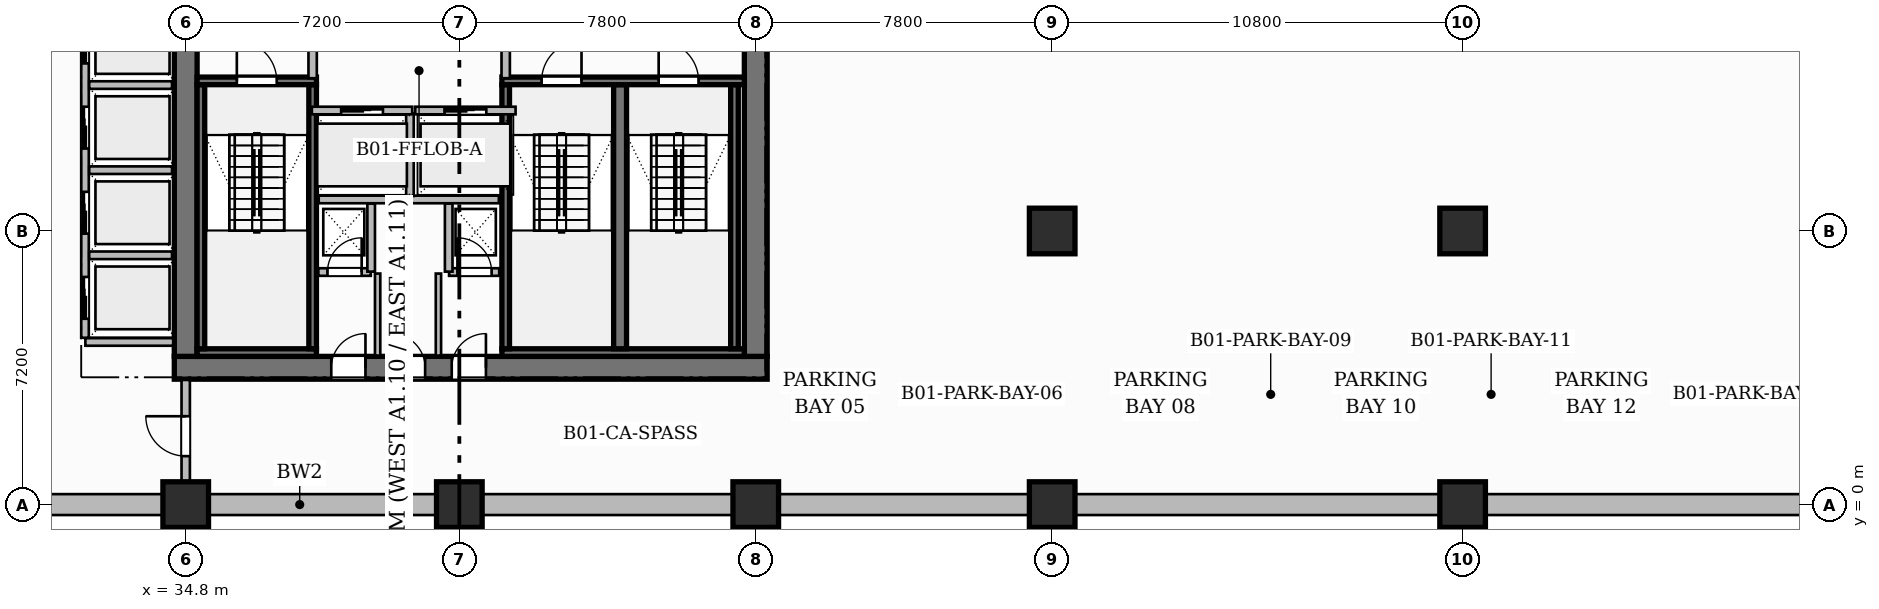
"""IFC4 building model, lengths in metres.
Left out: names, types, materials, properties, quantities, classifications, styles, units other than length and angle.
Written with IfcOpenShell. Run it as: python <this file> out.ifc"""

import sys

from ifc_helpers import new_model, si_unit, direction, frame, frame_2d, origin, origin_2d, place, context, subcontext, project, spatial, rectangle, extrude, source, transform, mapped, element, fill, save


model = new_model("IFC4")
c1 = context("Model", 3, precision=1e-05, world=origin(), true_north=direction((0.0, 1.0)))
c2 = subcontext(c1, "Body", "Model", "MODEL_VIEW")
j1 = project(units=[si_unit("LENGTHUNIT", "METRE"), si_unit("PLANEANGLEUNIT", "RADIAN")], contexts=[c1])
p1 = place(None, origin())
s1 = spatial("IfcSite", under=j1, at=p1, CompositionType="ELEMENT")
p2 = place(p1, origin())
s2 = spatial("IfcBuilding", under=s1, at=p2, CompositionType="ELEMENT")
p3 = place(p2, frame((0.0, 0.0, -6.5)))
s3 = spatial("IfcBuildingStorey", under=s2, at=p3, CompositionType="ELEMENT", Elevation=-6.5)
p4 = place(p3, frame((-4.8, 0.0, 0.0), z_axis=(0.0, 0.0, 1.0), x_axis=(1.0, 0.0, 0.0)))
e1 = element("IfcWall", 1, at=p4, inside=s3, PredefinedType="USERDEFINED", context=c2, shape_type="SweptSolid", body=[
    extrude(rectangle(XDim=85.2, YDim=0.55, at=frame_2d((42.6, 0.0))), origin(), (0.0, 0.0, 1.0), 6.5),
])
p5 = place(p3, frame((34.5, 3.6, 0.0), z_axis=(0.0, 0.0, 1.0), x_axis=(1.0, 0.0, 0.0)))
e2 = element("IfcWall", 2, at=p5, inside=s3, PredefinedType="SHEAR", context=c2, shape_type="SweptSolid", body=[
    extrude(rectangle(XDim=15.6, YDim=0.6, at=frame_2d((7.8, 0.0))), origin(), (0.0, 0.0, 1.0), 6.5),
])
p6 = place(p5, frame((4.13, 0.0, 0.0)))
e3 = element("IfcOpeningElement", 3, at=p6, cuts=e2, PredefinedType="OPENING", context=c2, shape_type="SweptSolid", body=[
    extrude(rectangle(XDim=0.9, YDim=2.1, at=frame_2d((0.45, 1.05))), frame((0.0, 0.31, 0.0), z_axis=(0.0, -1.0, 0.0), x_axis=(1.0, 0.0, 0.0)), (0.0, 0.0, 1.0), 0.62),
])
p7 = place(p5, frame((5.7, 0.0, 0.0)))
e4 = element("IfcOpeningElement", 4, at=p7, cuts=e2, PredefinedType="OPENING", context=c2, shape_type="SweptSolid", body=[
    extrude(rectangle(XDim=0.9, YDim=2.1, at=frame_2d((0.45, 1.05))), frame((0.0, 0.31, 0.0), z_axis=(0.0, -1.0, 0.0), x_axis=(1.0, 0.0, 0.0)), (0.0, 0.0, 1.0), 0.62),
])
p8 = place(p5, frame((7.3, 0.0, 0.0)))
e5 = element("IfcOpeningElement", 5, at=p8, cuts=e2, PredefinedType="OPENING", context=c2, shape_type="SweptSolid", body=[
    extrude(rectangle(XDim=0.9, YDim=2.1, at=frame_2d((0.45, 1.05))), frame((0.0, 0.31, 0.0), z_axis=(0.0, -1.0, 0.0), x_axis=(1.0, 0.0, 0.0)), (0.0, 0.0, 1.0), 0.62),
])
for number, where, z_axis, x_axis in (
    (6, (34.8, 3.9, 0.0), (0.0, 0.0, 1.0), (0.0, 1.0, 0.0)),
    (7, (49.8, 3.9, 0.0), (0.0, 0.0, 1.0), (0.0, 1.0, 0.0)),
):
    element("IfcWall", number, at=place(p3, frame(where, z_axis=z_axis, x_axis=x_axis)), inside=s3, PredefinedType="SHEAR", context=c2, shape_type="SweptSolid", body=[
        extrude(rectangle(XDim=10.2, YDim=0.6, at=frame_2d((5.1, 0.0))), origin(), (0.0, 0.0, 1.0), 6.5),
    ])
m1 = source(origin(), c2, "Body", "SweptSolid", [
    extrude(rectangle(XDim=1.2, YDim=1.2, at=origin_2d()), origin(), (0.0, 0.0, 1.0), 6.5),
])
for number, where, z_axis, x_axis in (
    (8, (34.8, 0.0, 0.0), (0.0, 0.0, 1.0), (1.0, 0.0, 0.0)),
    (9, (42.0, 0.0, 0.0), (0.0, 0.0, 1.0), (1.0, 0.0, 0.0)),
    (10, (49.8, 0.0, 0.0), (0.0, 0.0, 1.0), (1.0, 0.0, 0.0)),
    (11, (57.6, 0.0, 0.0), (0.0, 0.0, 1.0), (1.0, 0.0, 0.0)),
    (12, (57.6, 7.2, 0.0), (0.0, 0.0, 1.0), (1.0, 0.0, 0.0)),
    (13, (68.4, 0.0, 0.0), (0.0, 0.0, 1.0), (1.0, 0.0, 0.0)),
    (14, (68.4, 7.2, 0.0), (0.0, 0.0, 1.0), (1.0, 0.0, 0.0)),
):
    element("IfcColumn", number, at=place(p3, frame(where, z_axis=z_axis, x_axis=x_axis)), inside=s3, PredefinedType="COLUMN", context=c2, shape_type="MappedRepresentation", body=[
        mapped(m1, transform((0.0, 0.0, 0.0), scale=1.0)),
    ])
p9 = place(p3, frame((35.1, 4.0, 0.0), z_axis=(0.0, 0.0, 1.0), x_axis=(1.0, 0.0, 0.0)))
e15 = element("IfcWall", 15, at=p9, inside=s3, PredefinedType="SHEAR", context=c2, shape_type="SweptSolid", body=[
    extrude(rectangle(XDim=3.14, YDim=0.2, at=frame_2d((1.57, 0.0))), origin(), (0.0, 0.0, 1.0), 6.5),
])
for number, where, z_axis, x_axis in (
    (16, (35.2, 4.1, 0.0), (0.0, 0.0, 1.0), (0.0, 1.0, 0.0)),
    (17, (38.14, 4.1, 0.0), (0.0, 0.0, 1.0), (0.0, 1.0, 0.0)),
):
    element("IfcWall", number, at=place(p3, frame(where, z_axis=z_axis, x_axis=x_axis)), inside=s3, PredefinedType="SHEAR", context=c2, shape_type="SweptSolid", body=[
        extrude(rectangle(XDim=6.95, YDim=0.2, at=frame_2d((3.475, 0.0))), origin(), (0.0, 0.0, 1.0), 6.5),
    ])
p10 = place(p3, frame((35.1, 11.15, 0.0), z_axis=(0.0, 0.0, 1.0), x_axis=(1.0, 0.0, 0.0)))
e18 = element("IfcWall", 18, at=p10, inside=s3, PredefinedType="SHEAR", context=c2, shape_type="SweptSolid", body=[
    extrude(rectangle(XDim=3.14, YDim=0.2, at=frame_2d((1.57, 0.0))), origin(), (0.0, 0.0, 1.0), 6.5),
])
p11 = place(p10, frame((1.045, 0.0, 0.0)))
e19 = element("IfcOpeningElement", 19, at=p11, cuts=e18, PredefinedType="OPENING", context=c2, shape_type="SweptSolid", body=[
    extrude(rectangle(XDim=1.05, YDim=2.2, at=frame_2d((0.525, 1.1))), frame((0.0, 0.11, 0.0), z_axis=(0.0, -1.0, 0.0), x_axis=(1.0, 0.0, 0.0)), (0.0, 0.0, 1.0), 0.22),
])
p12 = place(p3, frame((43.12, 4.0, 0.0), z_axis=(0.0, 0.0, 1.0), x_axis=(1.0, 0.0, 0.0)))
e20 = element("IfcWall", 20, at=p12, inside=s3, PredefinedType="SHEAR", context=c2, shape_type="SweptSolid", body=[
    extrude(rectangle(XDim=6.38, YDim=0.2, at=frame_2d((3.19, 0.0))), origin(), (0.0, 0.0, 1.0), 6.5),
])
p13 = place(p3, frame((43.22, 4.1, 0.0), z_axis=(0.0, 0.0, 1.0), x_axis=(0.0, 1.0, 0.0)))
e21 = element("IfcWall", 21, at=p13, inside=s3, PredefinedType="SHEAR", context=c2, shape_type="SweptSolid", body=[
    extrude(rectangle(XDim=6.95, YDim=0.2, at=frame_2d((3.475, 0.0))), origin(), (0.0, 0.0, 1.0), 6.5),
])
p14 = place(p3, frame((46.23, 4.1, 0.0), z_axis=(0.0, 0.0, 1.0), x_axis=(0.0, 1.0, 0.0)))
e22 = element("IfcWall", 22, at=p14, inside=s3, PredefinedType="SHEAR", context=c2, shape_type="SweptSolid", body=[
    extrude(rectangle(XDim=6.95, YDim=0.34, at=frame_2d((3.475, 0.0))), origin(), (0.0, 0.0, 1.0), 6.5),
])
p15 = place(p3, frame((49.24, 4.1, 0.0), z_axis=(0.0, 0.0, 1.0), x_axis=(0.0, 1.0, 0.0)))
e23 = element("IfcWall", 23, at=p15, inside=s3, PredefinedType="SHEAR", context=c2, shape_type="SweptSolid", body=[
    extrude(rectangle(XDim=6.95, YDim=0.2, at=frame_2d((3.475, 0.0))), origin(), (0.0, 0.0, 1.0), 6.5),
])
p16 = place(p3, frame((43.12, 11.15, 0.0), z_axis=(0.0, 0.0, 1.0), x_axis=(1.0, 0.0, 0.0)))
e24 = element("IfcWall", 24, at=p16, inside=s3, PredefinedType="SHEAR", context=c2, shape_type="SweptSolid", body=[
    extrude(rectangle(XDim=6.38, YDim=0.2, at=frame_2d((3.19, 0.0))), origin(), (0.0, 0.0, 1.0), 6.5),
])
p17 = place(p16, frame((1.045, 0.0, 0.0)))
e25 = element("IfcOpeningElement", 25, at=p17, cuts=e24, PredefinedType="OPENING", context=c2, shape_type="SweptSolid", body=[
    extrude(rectangle(XDim=1.05, YDim=2.2, at=frame_2d((0.525, 1.1))), frame((0.0, 0.11, 0.0), z_axis=(0.0, -1.0, 0.0), x_axis=(1.0, 0.0, 0.0)), (0.0, 0.0, 1.0), 0.22),
])
p18 = place(p16, frame((4.125, 0.0, 0.0)))
e26 = element("IfcOpeningElement", 26, at=p18, cuts=e24, PredefinedType="OPENING", context=c2, shape_type="SweptSolid", body=[
    extrude(rectangle(XDim=1.05, YDim=2.2, at=frame_2d((0.525, 1.1))), frame((0.0, 0.11, 0.0), z_axis=(0.0, -1.0, 0.0), x_axis=(1.0, 0.0, 0.0)), (0.0, 0.0, 1.0), 0.22),
])
p19 = place(p3, frame((38.3, 8.03, 0.0), z_axis=(0.0, 0.0, 1.0), x_axis=(1.0, 0.0, 0.0)))
e27 = element("IfcWall", 27, at=p19, inside=s3, PredefinedType="PARTITIONING", context=c2, shape_type="SweptSolid", body=[
    extrude(rectangle(XDim=4.74, YDim=0.2, at=frame_2d((2.37, 0.0))), origin(), (0.0, 0.0, 1.0), 6.1),
])
p20 = place(p3, frame((40.7, 8.12, 0.0), z_axis=(0.0, 0.0, 1.0), x_axis=(0.0, 1.0, 0.0)))
e28 = element("IfcWall", 28, at=p20, inside=s3, PredefinedType="PARTITIONING", context=c2, shape_type="SweptSolid", body=[
    extrude(rectangle(XDim=2.18, YDim=0.2, at=frame_2d((1.09, 0.0))), origin(), (0.0, 0.0, 1.0), 6.1),
])
p21 = place(p3, frame((38.14, 11.22, 0.0), z_axis=(0.0, 0.0, 1.0), x_axis=(0.0, 1.0, 0.0)))
e29 = element("IfcWall", 29, at=p21, inside=s3, PredefinedType="PARTITIONING", context=c2, shape_type="SweptSolid", body=[
    extrude(rectangle(XDim=2.86, YDim=0.22, at=frame_2d((1.43, 0.0))), origin(), (0.0, 0.0, 1.0), 6.1),
])
p22 = place(p21, frame((0.905, 0.0, 0.0)))
e30 = element("IfcOpeningElement", 30, at=p22, cuts=e29, PredefinedType="OPENING", context=c2, shape_type="SweptSolid", body=[
    extrude(rectangle(XDim=1.05, YDim=2.15, at=frame_2d((0.525, 1.075))), frame((0.0, 0.12, 0.0), z_axis=(0.0, -1.0, 0.0), x_axis=(1.0, 0.0, 0.0)), (0.0, 0.0, 1.0), 0.24),
])
p23 = place(p3, frame((43.22, 11.22, 0.0), z_axis=(0.0, 0.0, 1.0), x_axis=(0.0, 1.0, 0.0)))
e31 = element("IfcWall", 31, at=p23, inside=s3, PredefinedType="PARTITIONING", context=c2, shape_type="SweptSolid", body=[
    extrude(rectangle(XDim=2.86, YDim=0.22, at=frame_2d((1.43, 0.0))), origin(), (0.0, 0.0, 1.0), 6.1),
])
p24 = place(p23, frame((0.905, 0.0, 0.0)))
e32 = element("IfcOpeningElement", 32, at=p24, cuts=e31, PredefinedType="OPENING", context=c2, shape_type="SweptSolid", body=[
    extrude(rectangle(XDim=1.05, YDim=2.15, at=frame_2d((0.525, 1.075))), frame((0.0, 0.12, 0.0), z_axis=(0.0, -1.0, 0.0), x_axis=(1.0, 0.0, 0.0)), (0.0, 0.0, 1.0), 0.24),
])
p25 = place(p3, frame((38.29, 6.12, 0.0), z_axis=(0.0, 0.0, 1.0), x_axis=(1.0, 0.0, 0.0)))
e33 = element("IfcWall", 33, at=p25, inside=s3, PredefinedType="PARTITIONING", context=c2, shape_type="SweptSolid", body=[
    extrude(rectangle(XDim=1.38, YDim=0.2, at=frame_2d((0.69, 0.0))), origin(), (0.0, 0.0, 1.0), 6.1),
])
p26 = place(p25, frame((0.24, 0.0, 0.0)))
e34 = element("IfcOpeningElement", 34, at=p26, cuts=e33, PredefinedType="OPENING", context=c2, shape_type="SweptSolid", body=[
    extrude(rectangle(XDim=0.9, YDim=2.1, at=frame_2d((0.45, 1.05))), frame((0.0, 0.11, 0.0), z_axis=(0.0, -1.0, 0.0), x_axis=(1.0, 0.0, 0.0)), (0.0, 0.0, 1.0), 0.22),
])
p27 = place(p3, frame((39.68, 6.13, 0.0), z_axis=(0.0, 0.0, 1.0), x_axis=(0.0, 1.0, 0.0)))
e35 = element("IfcWall", 35, at=p27, inside=s3, PredefinedType="PARTITIONING", context=c2, shape_type="SweptSolid", body=[
    extrude(rectangle(XDim=1.79, YDim=0.2, at=frame_2d((0.895, 0.0))), origin(), (0.0, 0.0, 1.0), 6.1),
])
p28 = place(p3, frame((41.73, 6.12, 0.0), z_axis=(0.0, 0.0, 1.0), x_axis=(1.0, 0.0, 0.0)))
e36 = element("IfcWall", 36, at=p28, inside=s3, PredefinedType="PARTITIONING", context=c2, shape_type="SweptSolid", body=[
    extrude(rectangle(XDim=1.32, YDim=0.2, at=frame_2d((0.66, 0.0))), origin(), (0.0, 0.0, 1.0), 6.1),
])
p29 = place(p28, frame((0.22, 0.0, 0.0)))
e37 = element("IfcOpeningElement", 37, at=p29, cuts=e36, PredefinedType="OPENING", context=c2, shape_type="SweptSolid", body=[
    extrude(rectangle(XDim=0.9, YDim=2.1, at=frame_2d((0.45, 1.05))), frame((0.0, 0.11, 0.0), z_axis=(0.0, -1.0, 0.0), x_axis=(1.0, 0.0, 0.0)), (0.0, 0.0, 1.0), 0.22),
])
p30 = place(p3, frame((41.72, 6.13, 0.0), z_axis=(0.0, 0.0, 1.0), x_axis=(0.0, 1.0, 0.0)))
e38 = element("IfcWall", 38, at=p30, inside=s3, PredefinedType="PARTITIONING", context=c2, shape_type="SweptSolid", body=[
    extrude(rectangle(XDim=1.79, YDim=0.2, at=frame_2d((0.895, 0.0))), origin(), (0.0, 0.0, 1.0), 6.1),
])
for number, where, z_axis, x_axis in (
    (39, (39.85, 3.92, 0.0), (0.0, 0.0, 1.0), (0.0, 1.0, 0.0)),
    (40, (41.45, 3.92, 0.0), (0.0, 0.0, 1.0), (0.0, 1.0, 0.0)),
):
    element("IfcWall", number, at=place(p3, frame(where, z_axis=z_axis, x_axis=x_axis)), inside=s3, PredefinedType="PARTITIONING", context=c2, shape_type="SweptSolid", body=[
        extrude(rectangle(XDim=2.16, YDim=0.14, at=frame_2d((1.08, 0.0))), origin(), (0.0, 0.0, 1.0), 6.1),
    ])
p31 = place(p3, frame((32.16, 4.28, 0.0), z_axis=(0.0, 0.0, 1.0), x_axis=(1.0, 0.0, 0.0)))
e41 = element("IfcWall", 41, at=p31, inside=s3, PredefinedType="PARTITIONING", context=c2, shape_type="SweptSolid", body=[
    extrude(rectangle(XDim=2.31, YDim=0.2, at=frame_2d((1.155, 0.0))), origin(), (0.0, 0.0, 1.0), 6.1),
])
p32 = place(p3, frame((32.15, 4.39, 0.0), z_axis=(0.0, 0.0, 1.0), x_axis=(0.0, 1.0, 0.0)))
e42 = element("IfcWall", 42, at=p32, inside=s3, PredefinedType="PARTITIONING", context=c2, shape_type="SweptSolid", body=[
    extrude(rectangle(XDim=8.82, YDim=0.2, at=frame_2d((4.41, 0.0))), origin(), (0.0, 0.0, 1.0), 5.335),
])
p33 = place(p32, frame((0.5, 0.0, 0.0)))
e43 = element("IfcOpeningElement", 43, at=p33, cuts=e42, PredefinedType="OPENING", context=c2, shape_type="SweptSolid", body=[
    extrude(rectangle(XDim=1.1, YDim=2.2, at=frame_2d((0.55, 1.1))), frame((0.0, 0.11, 0.0), z_axis=(0.0, -1.0, 0.0), x_axis=(1.0, 0.0, 0.0)), (0.0, 0.0, 1.0), 0.22),
])
p34 = place(p32, frame((2.74, 0.0, 0.0)))
e44 = element("IfcOpeningElement", 44, at=p34, cuts=e42, PredefinedType="OPENING", context=c2, shape_type="SweptSolid", body=[
    extrude(rectangle(XDim=1.1, YDim=2.2, at=frame_2d((0.55, 1.1))), frame((0.0, 0.11, 0.0), z_axis=(0.0, -1.0, 0.0), x_axis=(1.0, 0.0, 0.0)), (0.0, 0.0, 1.0), 0.22),
])
p35 = place(p32, frame((4.98, 0.0, 0.0)))
e45 = element("IfcOpeningElement", 45, at=p35, cuts=e42, PredefinedType="OPENING", context=c2, shape_type="SweptSolid", body=[
    extrude(rectangle(XDim=1.1, YDim=2.2, at=frame_2d((0.55, 1.1))), frame((0.0, 0.11, 0.0), z_axis=(0.0, -1.0, 0.0), x_axis=(1.0, 0.0, 0.0)), (0.0, 0.0, 1.0), 0.22),
])
p36 = place(p32, frame((7.22, 0.0, 0.0)))
e46 = element("IfcOpeningElement", 46, at=p36, cuts=e42, PredefinedType="OPENING", context=c2, shape_type="SweptSolid", body=[
    extrude(rectangle(XDim=1.1, YDim=2.2, at=frame_2d((0.55, 1.1))), frame((0.0, 0.11, 0.0), z_axis=(0.0, -1.0, 0.0), x_axis=(1.0, 0.0, 0.0)), (0.0, 0.0, 1.0), 0.22),
])
for number, where, z_axis, x_axis in (
    (47, (32.26, 6.56, 0.0), (0.0, 0.0, 1.0), (1.0, 0.0, 0.0)),
    (48, (32.26, 8.8, 0.0), (0.0, 0.0, 1.0), (1.0, 0.0, 0.0)),
    (49, (32.26, 11.04, 0.0), (0.0, 0.0, 1.0), (1.0, 0.0, 0.0)),
):
    element("IfcWall", number, at=place(p3, frame(where, z_axis=z_axis, x_axis=x_axis)), inside=s3, PredefinedType="PARTITIONING", context=c2, shape_type="SweptSolid", body=[
        extrude(rectangle(XDim=2.18, YDim=0.2, at=frame_2d((1.09, 0.0))), origin(), (0.0, 0.0, 1.0), 6.1),
    ])
p37 = place(p3, frame((34.8, 0.37, 0.0), z_axis=(0.0, 0.0, 1.0), x_axis=(0.0, 1.0, 0.0)))
e50 = element("IfcWall", 50, at=p37, inside=s3, PredefinedType="PARTITIONING", context=c2, shape_type="SweptSolid", body=[
    extrude(rectangle(XDim=2.91, YDim=0.22, at=frame_2d((1.455, 0.0))), origin(), (0.0, 0.0, 1.0), 6.1),
])
p38 = place(p37, frame((0.905, 0.0, 0.0)))
e51 = element("IfcOpeningElement", 51, at=p38, cuts=e50, PredefinedType="OPENING", context=c2, shape_type="SweptSolid", body=[
    extrude(rectangle(XDim=1.05, YDim=2.15, at=frame_2d((0.525, 1.075))), frame((0.0, 0.12, 0.0), z_axis=(0.0, -1.0, 0.0), x_axis=(1.0, 0.0, 0.0)), (0.0, 0.0, 1.0), 0.24),
])
p39 = place(p3, frame((38.12, 10.37, 0.0), z_axis=(0.0, 0.0, 1.0), x_axis=(1.0, 0.0, 0.0)))
e52 = element("IfcWall", 52, at=p39, inside=s3, PredefinedType="PARTITIONING", context=c2, shape_type="SweptSolid", body=[
    extrude(rectangle(XDim=2.64, YDim=0.2, at=frame_2d((1.32, 0.0))), origin(), (0.0, 0.0, 1.0), 6.1),
])
p40 = place(p39, frame((0.77, 0.0, 0.0)))
e53 = element("IfcOpeningElement", 53, at=p40, cuts=e52, PredefinedType="OPENING", context=c2, shape_type="SweptSolid", body=[
    extrude(rectangle(XDim=1.1, YDim=2.2, at=frame_2d((0.55, 1.1))), frame((0.0, 0.11, 0.0), z_axis=(0.0, -1.0, 0.0), x_axis=(1.0, 0.0, 0.0)), (0.0, 0.0, 1.0), 0.22),
])
p41 = place(p3, frame((40.84, 10.37, 0.0), z_axis=(0.0, 0.0, 1.0), x_axis=(1.0, 0.0, 0.0)))
e54 = element("IfcWall", 54, at=p41, inside=s3, PredefinedType="PARTITIONING", context=c2, shape_type="SweptSolid", body=[
    extrude(rectangle(XDim=2.64, YDim=0.2, at=frame_2d((1.32, 0.0))), origin(), (0.0, 0.0, 1.0), 6.1),
])
p42 = place(p41, frame((0.77, 0.0, 0.0)))
e55 = element("IfcOpeningElement", 55, at=p42, cuts=e54, PredefinedType="OPENING", context=c2, shape_type="SweptSolid", body=[
    extrude(rectangle(XDim=1.1, YDim=2.2, at=frame_2d((0.55, 1.1))), frame((0.0, 0.11, 0.0), z_axis=(0.0, -1.0, 0.0), x_axis=(1.0, 0.0, 0.0)), (0.0, 0.0, 1.0), 0.22),
])
m2 = source(origin(), c2, "Body", "SweptSolid", [
    extrude(rectangle(XDim=1.05, YDim=2.2, at=frame_2d((0.525, 1.1))), frame((0.0, 0.025, 0.0), z_axis=(0.0, -1.0, 0.0), x_axis=(1.0, 0.0, 0.0)), (0.0, 0.0, 1.0), 0.05),
])
p43 = place(p11, origin())
e56 = element("IfcDoor", 56, at=p43, inside=s3, OperationType="SINGLE_SWING_LEFT", PredefinedType="DOOR", context=c2, shape_type="MappedRepresentation", body=[
    mapped(m2, transform((0.0, 0.0, 0.0), scale=1.0)),
])
fill(e19, e56)
p44 = place(p17, origin())
e57 = element("IfcDoor", 57, at=p44, inside=s3, OperationType="SINGLE_SWING_RIGHT", PredefinedType="DOOR", context=c2, shape_type="MappedRepresentation", body=[
    mapped(m2, transform((0.0, 0.0, 0.0), scale=1.0)),
])
fill(e25, e57)
p45 = place(p18, origin())
e58 = element("IfcDoor", 58, at=p45, inside=s3, OperationType="SINGLE_SWING_LEFT", PredefinedType="DOOR", context=c2, shape_type="MappedRepresentation", body=[
    mapped(m2, transform((0.0, 0.0, 0.0), scale=1.0)),
])
fill(e26, e58)
m3 = source(origin(), c2, "Body", "SweptSolid", [
    extrude(rectangle(XDim=0.9, YDim=2.1, at=frame_2d((0.45, 1.05))), frame((0.0, 0.025, 0.0), z_axis=(0.0, -1.0, 0.0), x_axis=(1.0, 0.0, 0.0)), (0.0, 0.0, 1.0), 0.05),
])
p46 = place(p26, origin())
e59 = element("IfcDoor", 59, at=p46, inside=s3, OperationType="SINGLE_SWING_RIGHT", PredefinedType="DOOR", context=c2, shape_type="MappedRepresentation", body=[
    mapped(m3, transform((0.0, 0.0, 0.0), scale=1.0)),
])
fill(e34, e59)
p47 = place(p29, origin())
e60 = element("IfcDoor", 60, at=p47, inside=s3, OperationType="SINGLE_SWING_LEFT", PredefinedType="DOOR", context=c2, shape_type="MappedRepresentation", body=[
    mapped(m3, transform((0.0, 0.0, 0.0), scale=1.0)),
])
fill(e37, e60)
p48 = place(p6, origin())
e61 = element("IfcDoor", 61, at=p48, inside=s3, OperationType="SINGLE_SWING_RIGHT", PredefinedType="DOOR", context=c2, shape_type="MappedRepresentation", body=[
    mapped(m3, transform((0.0, 0.0, 0.0), scale=1.0)),
])
fill(e3, e61)
p49 = place(p7, origin())
e62 = element("IfcDoor", 62, at=p49, inside=s3, OperationType="SINGLE_SWING_LEFT", PredefinedType="DOOR", context=c2, shape_type="MappedRepresentation", body=[
    mapped(m3, transform((0.0, 0.0, 0.0), scale=1.0)),
])
fill(e4, e62)
p50 = place(p8, origin())
e63 = element("IfcDoor", 63, at=p50, inside=s3, OperationType="SINGLE_SWING_RIGHT", PredefinedType="DOOR", context=c2, shape_type="MappedRepresentation", body=[
    mapped(m3, transform((0.0, 0.0, 0.0), scale=1.0)),
])
fill(e5, e63)
m4 = source(origin(), c2, "Body", "SweptSolid", [
    extrude(rectangle(XDim=1.05, YDim=2.15, at=frame_2d((0.525, 1.075))), frame((0.0, 0.025, 0.0), z_axis=(0.0, -1.0, 0.0), x_axis=(1.0, 0.0, 0.0)), (0.0, 0.0, 1.0), 0.05),
])
p51 = place(p38, origin())
e64 = element("IfcDoor", 64, at=p51, inside=s3, OperationType="SINGLE_SWING_RIGHT", PredefinedType="DOOR", context=c2, shape_type="MappedRepresentation", body=[
    mapped(m4, transform((0.0, 0.0, 0.0), scale=1.0)),
])
fill(e51, e64)
m5 = source(origin(), c2, "Body", "SweptSolid", [
    extrude(rectangle(XDim=1.1, YDim=2.2, at=frame_2d((0.55, 1.1))), frame((0.0, 0.025, 0.0), z_axis=(0.0, -1.0, 0.0), x_axis=(1.0, 0.0, 0.0)), (0.0, 0.0, 1.0), 0.05),
])
p52 = place(p40, origin())
e65 = element("IfcDoor", 65, at=p52, inside=s3, OperationType="SLIDING_TO_LEFT", PredefinedType="DOOR", context=c2, shape_type="MappedRepresentation", body=[
    mapped(m5, transform((0.0, 0.0, 0.0), scale=1.0)),
])
fill(e53, e65)
p53 = place(p42, origin())
e66 = element("IfcDoor", 66, at=p53, inside=s3, OperationType="SLIDING_TO_LEFT", PredefinedType="DOOR", context=c2, shape_type="MappedRepresentation", body=[
    mapped(m5, transform((0.0, 0.0, 0.0), scale=1.0)),
])
fill(e55, e66)
p54 = place(p33, origin())
e67 = element("IfcDoor", 67, at=p54, inside=s3, OperationType="SLIDING_TO_LEFT", PredefinedType="DOOR", context=c2, shape_type="MappedRepresentation", body=[
    mapped(m5, transform((0.0, 0.0, 0.0), scale=1.0)),
])
fill(e43, e67)
p55 = place(p34, origin())
e68 = element("IfcDoor", 68, at=p55, inside=s3, OperationType="SLIDING_TO_LEFT", PredefinedType="DOOR", context=c2, shape_type="MappedRepresentation", body=[
    mapped(m5, transform((0.0, 0.0, 0.0), scale=1.0)),
])
fill(e44, e68)
p56 = place(p35, origin())
e69 = element("IfcDoor", 69, at=p56, inside=s3, OperationType="SLIDING_TO_LEFT", PredefinedType="DOOR", context=c2, shape_type="MappedRepresentation", body=[
    mapped(m5, transform((0.0, 0.0, 0.0), scale=1.0)),
])
fill(e45, e69)
p57 = place(p36, origin())
e70 = element("IfcDoor", 70, at=p57, inside=s3, OperationType="SLIDING_TO_LEFT", PredefinedType="DOOR", context=c2, shape_type="MappedRepresentation", body=[
    mapped(m5, transform((0.0, 0.0, 0.0), scale=1.0)),
])
fill(e46, e70)
save(model, sys.argv[1])
